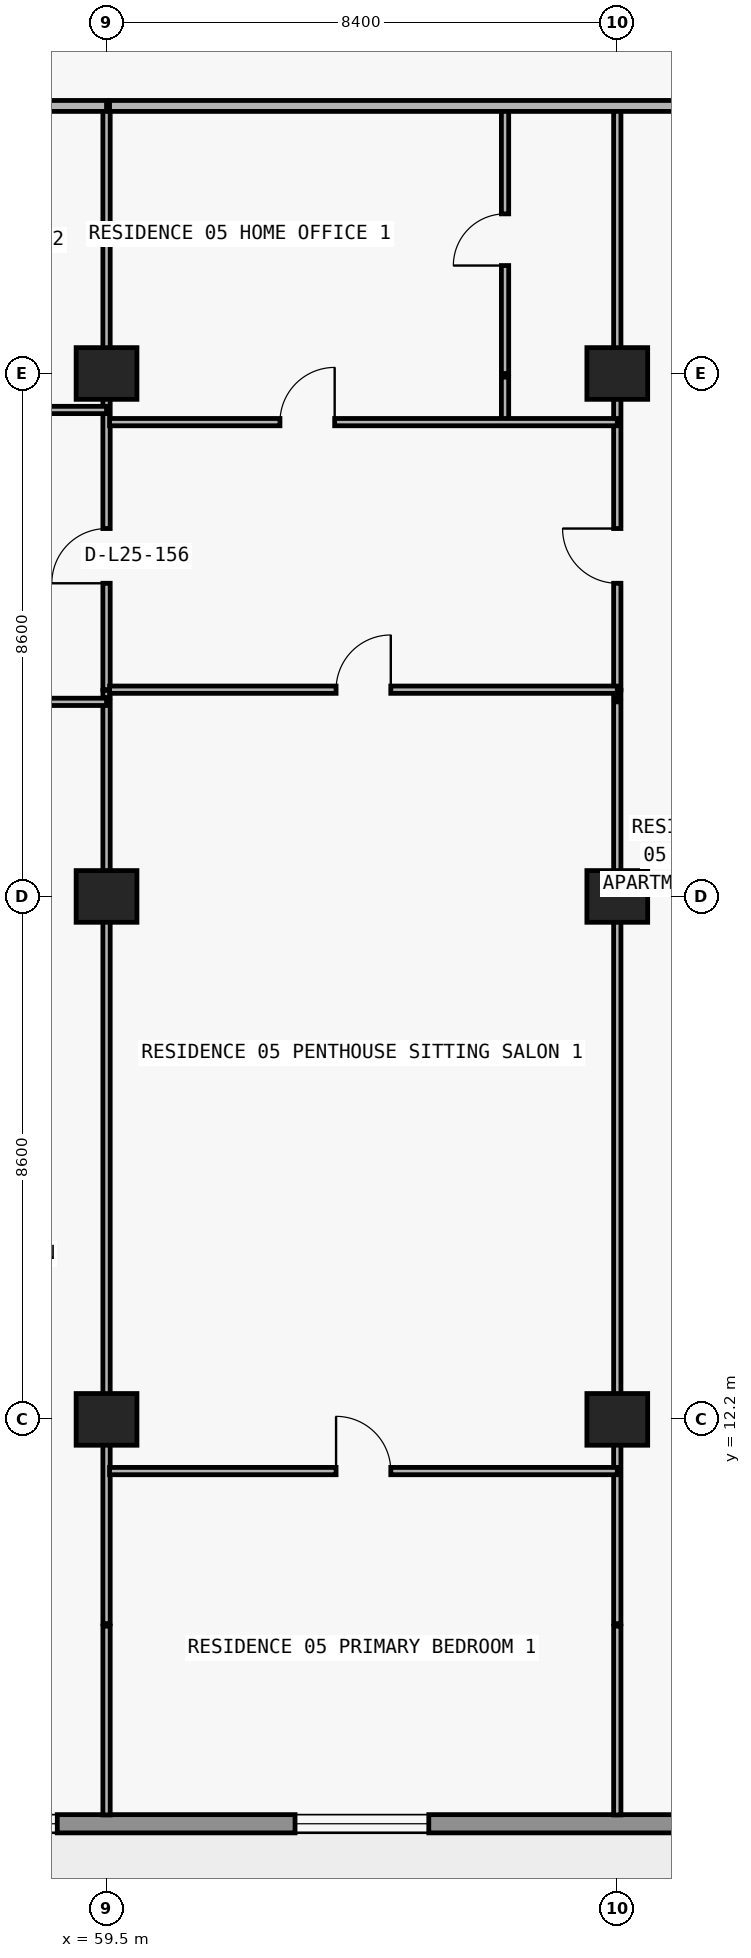
"""IFC4 building model, lengths in metres.
Left out: names, types, materials, properties, quantities, classifications, styles, units other than length and angle.
Written with IfcOpenShell. Run it as: python <this file> out.ifc"""

import sys

from ifc_helpers import new_model, si_unit, direction, frame, frame_2d, origin, origin_2d, place, context, subcontext, project, spatial, rectangle, extrude, element, fill, save


model = new_model("IFC4")
c1 = context("Model", 3, precision=1e-05, world=origin(), true_north=direction((0.0, 1.0)))
c2 = subcontext(c1, "Body", "Model", "MODEL_VIEW")
j1 = project(units=[si_unit("LENGTHUNIT", "METRE"), si_unit("PLANEANGLEUNIT", "RADIAN")], contexts=[c1])
p1 = place(None, origin())
s1 = spatial("IfcSite", under=j1, at=p1, CompositionType="ELEMENT")
p2 = place(p1, origin())
s2 = spatial("IfcBuilding", under=s1, at=p2, CompositionType="ELEMENT")
p3 = place(p2, frame((0.0, 0.0, 94.5)))
s3 = spatial("IfcBuildingStorey", under=s2, at=p3, CompositionType="ELEMENT", Elevation=94.5)
for number, where, z_axis, x_axis in (
    (1, (59.5, 12.2, 0.0), (0.0, 0.0, 1.0), (1.0, 0.0, 0.0)),
    (2, (67.9, 12.2, 0.0), (0.0, 0.0, 1.0), (1.0, 0.0, 0.0)),
    (3, (59.5, 20.8, 0.0), (0.0, 0.0, 1.0), (1.0, 0.0, 0.0)),
    (4, (67.9, 20.8, 0.0), (0.0, 0.0, 1.0), (1.0, 0.0, 0.0)),
    (5, (59.5, 29.4, 0.0), (0.0, 0.0, 1.0), (1.0, 0.0, 0.0)),
    (6, (67.9, 29.4, 0.0), (0.0, 0.0, 1.0), (1.0, 0.0, 0.0)),
):
    element("IfcColumn", number, at=place(p3, frame(where, z_axis=z_axis, x_axis=x_axis)), inside=s3, PredefinedType="COLUMN", context=c2, shape_type="SweptSolid", body=[
        extrude(rectangle(XDim=1.0, YDim=0.85, at=origin_2d()), origin(), (0.0, 0.0, 1.0), 3.0),
    ])
p4 = place(p3, frame((70.1, 5.55, 0.0), z_axis=(0.0, 0.0, 1.0), x_axis=(-1.0, 0.0, 0.0)))
e7 = element("IfcWall", 7, at=p4, inside=s3, PredefinedType="STANDARD", context=c2, shape_type="SweptSolid", body=[
    extrude(rectangle(XDim=62.4, YDim=0.3, at=frame_2d((31.2, 0.0))), origin(), (0.0, 0.0, 1.0), 3.0),
])
p5 = place(p4, frame((57.29, 0.0, 0.0)))
e8 = element("IfcOpeningElement", 8, at=p5, cuts=e7, PredefinedType="OPENING", context=c2, shape_type="SweptSolid", body=[
    extrude(rectangle(XDim=2.0, YDim=2.3, at=frame_2d((1.0, 1.15))), frame((0.0, 0.16, 0.0), z_axis=(0.0, -1.0, 0.0), x_axis=(1.0, 0.0, 0.0)), (0.0, 0.0, 1.0), 0.32),
])
p6 = place(p4, frame((52.61, 0.0, 0.65)))
e9 = element("IfcOpeningElement", 9, at=p6, cuts=e7, PredefinedType="OPENING", context=c2, shape_type="SweptSolid", body=[
    extrude(rectangle(XDim=2.6, YDim=1.85, at=frame_2d((1.3, 0.925))), frame((0.0, 0.16, 0.0), z_axis=(0.0, -1.0, 0.0), x_axis=(1.0, 0.0, 0.0)), (0.0, 0.0, 1.0), 0.32),
])
p7 = place(p4, frame((46.5, 0.0, 0.85)))
e10 = element("IfcOpeningElement", 10, at=p7, cuts=e7, PredefinedType="OPENING", context=c2, shape_type="SweptSolid", body=[
    extrude(rectangle(XDim=2.2, YDim=1.55, at=frame_2d((1.1, 0.775))), frame((0.0, 0.16, 0.0), z_axis=(0.0, -1.0, 0.0), x_axis=(1.0, 0.0, 0.0)), (0.0, 0.0, 1.0), 0.32),
])
p8 = place(p4, frame((40.09, 0.0, 0.0)))
e11 = element("IfcOpeningElement", 11, at=p8, cuts=e7, PredefinedType="OPENING", context=c2, shape_type="SweptSolid", body=[
    extrude(rectangle(XDim=2.0, YDim=2.3, at=frame_2d((1.0, 1.15))), frame((0.0, 0.16, 0.0), z_axis=(0.0, -1.0, 0.0), x_axis=(1.0, 0.0, 0.0)), (0.0, 0.0, 1.0), 0.32),
])
p9 = place(p4, frame((35.99, 0.0, 0.85)))
e12 = element("IfcOpeningElement", 12, at=p9, cuts=e7, PredefinedType="OPENING", context=c2, shape_type="SweptSolid", body=[
    extrude(rectangle(XDim=1.8, YDim=1.55, at=frame_2d((0.9, 0.775))), frame((0.0, 0.16, 0.0), z_axis=(0.0, -1.0, 0.0), x_axis=(1.0, 0.0, 0.0)), (0.0, 0.0, 1.0), 0.32),
])
p10 = place(p4, frame((28.314, 0.0, 0.85)))
e13 = element("IfcOpeningElement", 13, at=p10, cuts=e7, PredefinedType="OPENING", context=c2, shape_type="SweptSolid", body=[
    extrude(rectangle(XDim=2.2, YDim=1.55, at=frame_2d((1.1, 0.775))), frame((0.0, 0.16, 0.0), z_axis=(0.0, -1.0, 0.0), x_axis=(1.0, 0.0, 0.0)), (0.0, 0.0, 1.0), 0.32),
])
p11 = place(p4, frame((24.09, 0.0, 0.0)))
e14 = element("IfcOpeningElement", 14, at=p11, cuts=e7, PredefinedType="OPENING", context=c2, shape_type="SweptSolid", body=[
    extrude(rectangle(XDim=2.0, YDim=2.3, at=frame_2d((1.0, 1.15))), frame((0.0, 0.16, 0.0), z_axis=(0.0, -1.0, 0.0), x_axis=(1.0, 0.0, 0.0)), (0.0, 0.0, 1.0), 0.32),
])
p12 = place(p4, frame((19.99, 0.0, 0.85)))
e15 = element("IfcOpeningElement", 15, at=p12, cuts=e7, PredefinedType="OPENING", context=c2, shape_type="SweptSolid", body=[
    extrude(rectangle(XDim=1.8, YDim=1.55, at=frame_2d((0.9, 0.775))), frame((0.0, 0.16, 0.0), z_axis=(0.0, -1.0, 0.0), x_axis=(1.0, 0.0, 0.0)), (0.0, 0.0, 1.0), 0.32),
])
p13 = place(p4, frame((16.09, 0.0, 0.0)))
e16 = element("IfcOpeningElement", 16, at=p13, cuts=e7, PredefinedType="OPENING", context=c2, shape_type="SweptSolid", body=[
    extrude(rectangle(XDim=2.0, YDim=2.3, at=frame_2d((1.0, 1.15))), frame((0.0, 0.16, 0.0), z_axis=(0.0, -1.0, 0.0), x_axis=(1.0, 0.0, 0.0)), (0.0, 0.0, 1.0), 0.32),
])
p14 = place(p4, frame((11.41, 0.0, 0.65)))
e17 = element("IfcOpeningElement", 17, at=p14, cuts=e7, PredefinedType="OPENING", context=c2, shape_type="SweptSolid", body=[
    extrude(rectangle(XDim=2.6, YDim=1.85, at=frame_2d((1.3, 0.925))), frame((0.0, 0.16, 0.0), z_axis=(0.0, -1.0, 0.0), x_axis=(1.0, 0.0, 0.0)), (0.0, 0.0, 1.0), 0.32),
])
p15 = place(p4, frame((5.3, 0.0, 0.85)))
e18 = element("IfcOpeningElement", 18, at=p15, cuts=e7, PredefinedType="OPENING", context=c2, shape_type="SweptSolid", body=[
    extrude(rectangle(XDim=2.2, YDim=1.55, at=frame_2d((1.1, 0.775))), frame((0.0, 0.16, 0.0), z_axis=(0.0, -1.0, 0.0), x_axis=(1.0, 0.0, 0.0)), (0.0, 0.0, 1.0), 0.32),
])
p16 = place(p3, frame((59.5, 5.695, 0.0), z_axis=(0.0, 0.0, 1.0), x_axis=(0.0, 1.0, 0.0)))
e19 = element("IfcWall", 19, at=p16, inside=s3, PredefinedType="PARTITIONING", context=c2, shape_type="SweptSolid", body=[
    extrude(rectangle(XDim=3.105, YDim=0.12, at=frame_2d((1.552, 0.0))), origin(), (0.0, 0.0, 1.0), 3.0),
])
p17 = place(p3, frame((59.5, 8.84, 0.0), z_axis=(0.0, 0.0, 1.0), x_axis=(0.0, 1.0, 0.0)))
e20 = element("IfcWall", 20, at=p17, inside=s3, PredefinedType="PARTITIONING", context=c2, shape_type="SweptSolid", body=[
    extrude(rectangle(XDim=15.16, YDim=0.12, at=frame_2d((7.58, 0.0))), origin(), (0.0, 0.0, 1.0), 2.124),
])
p18 = place(p3, frame((59.5, 24.07, 0.0), z_axis=(0.0, 0.0, 1.0), x_axis=(0.0, 1.0, 0.0)))
e21 = element("IfcWall", 21, at=p18, inside=s3, PredefinedType="PARTITIONING", context=c2, shape_type="SweptSolid", body=[
    extrude(rectangle(XDim=0.12, YDim=0.12, at=frame_2d((0.06, 0.0))), origin(), (0.0, 0.0, 1.0), 2.124),
])
p19 = place(p3, frame((59.5, 24.2, 0.0), z_axis=(0.0, 0.0, 1.0), x_axis=(0.0, 1.0, 0.0)))
e22 = element("IfcWall", 22, at=p19, inside=s3, PredefinedType="PARTITIONING", context=c2, shape_type="SweptSolid", body=[
    extrude(rectangle(XDim=5.14, YDim=0.12, at=frame_2d((2.57, 0.0))), origin(), (0.0, 0.0, 1.0), 2.124),
])
p20 = place(p19, frame((1.75, 0.0, 0.0)))
e23 = element("IfcOpeningElement", 23, at=p20, cuts=e22, PredefinedType="OPENING", context=c2, shape_type="SweptSolid", body=[
    extrude(rectangle(XDim=0.9, YDim=2.074, at=frame_2d((0.45, 1.037))), frame((0.0, 0.07, 0.0), z_axis=(0.0, -1.0, 0.0), x_axis=(1.0, 0.0, 0.0)), (0.0, 0.0, 1.0), 0.14),
])
p21 = place(p3, frame((59.5, 29.4, 0.0), z_axis=(0.0, 0.0, 1.0), x_axis=(0.0, 1.0, 0.0)))
e24 = element("IfcWall", 24, at=p21, inside=s3, PredefinedType="PARTITIONING", context=c2, shape_type="SweptSolid", body=[
    extrude(rectangle(XDim=4.4, YDim=0.12, at=frame_2d((2.2, 0.0))), origin(), (0.0, 0.0, 1.0), 2.124),
])
p22 = place(p3, frame((66.054, 28.6, 0.0), z_axis=(0.0, 0.0, 1.0), x_axis=(0.0, 1.0, 0.0)))
e25 = element("IfcWall", 25, at=p22, inside=s3, PredefinedType="PARTITIONING", context=c2, shape_type="SweptSolid", body=[
    extrude(rectangle(XDim=0.74, YDim=0.12, at=frame_2d((0.37, 0.0))), origin(), (0.0, 0.0, 1.0), 2.629),
])
p23 = place(p3, frame((66.054, 29.4, 0.0), z_axis=(0.0, 0.0, 1.0), x_axis=(0.0, 1.0, 0.0)))
e26 = element("IfcWall", 26, at=p23, inside=s3, PredefinedType="PARTITIONING", context=c2, shape_type="SweptSolid", body=[
    extrude(rectangle(XDim=4.4, YDim=0.12, at=frame_2d((2.2, 0.0))), origin(), (0.0, 0.0, 1.0), 2.629),
])
p24 = place(p23, frame((1.775, 0.0, 0.0)))
e27 = element("IfcOpeningElement", 27, at=p24, cuts=e26, PredefinedType="OPENING", context=c2, shape_type="SweptSolid", body=[
    extrude(rectangle(XDim=0.85, YDim=2.1, at=frame_2d((0.425, 1.05))), frame((0.0, 0.07, 0.0), z_axis=(0.0, -1.0, 0.0), x_axis=(1.0, 0.0, 0.0)), (0.0, 0.0, 1.0), 0.14),
])
p25 = place(p3, frame((67.9, 5.695, 0.0), z_axis=(0.0, 0.0, 1.0), x_axis=(0.0, 1.0, 0.0)))
e28 = element("IfcWall", 28, at=p25, inside=s3, PredefinedType="PARTITIONING", context=c2, shape_type="SweptSolid", body=[
    extrude(rectangle(XDim=3.105, YDim=0.12, at=frame_2d((1.552, 0.0))), origin(), (0.0, 0.0, 1.0), 3.0),
])
p26 = place(p3, frame((67.9, 8.84, 0.0), z_axis=(0.0, 0.0, 1.0), x_axis=(0.0, 1.0, 0.0)))
e29 = element("IfcWall", 29, at=p26, inside=s3, PredefinedType="PARTITIONING", context=c2, shape_type="SweptSolid", body=[
    extrude(rectangle(XDim=15.16, YDim=0.12, at=frame_2d((7.58, 0.0))), origin(), (0.0, 0.0, 1.0), 2.124),
])
p27 = place(p3, frame((67.9, 24.07, 0.0), z_axis=(0.0, 0.0, 1.0), x_axis=(0.0, 1.0, 0.0)))
e30 = element("IfcWall", 30, at=p27, inside=s3, PredefinedType="PARTITIONING", context=c2, shape_type="SweptSolid", body=[
    extrude(rectangle(XDim=0.12, YDim=0.12, at=frame_2d((0.06, 0.0))), origin(), (0.0, 0.0, 1.0), 2.124),
])
p28 = place(p3, frame((67.9, 24.2, 0.0), z_axis=(0.0, 0.0, 1.0), x_axis=(0.0, 1.0, 0.0)))
e31 = element("IfcWall", 31, at=p28, inside=s3, PredefinedType="PARTITIONING", context=c2, shape_type="SweptSolid", body=[
    extrude(rectangle(XDim=5.14, YDim=0.12, at=frame_2d((2.57, 0.0))), origin(), (0.0, 0.0, 1.0), 2.124),
])
p29 = place(p28, frame((1.75, 0.0, 0.0)))
e32 = element("IfcOpeningElement", 32, at=p29, cuts=e31, PredefinedType="OPENING", context=c2, shape_type="SweptSolid", body=[
    extrude(rectangle(XDim=0.9, YDim=2.074, at=frame_2d((0.45, 1.037))), frame((0.0, 0.07, 0.0), z_axis=(0.0, -1.0, 0.0), x_axis=(1.0, 0.0, 0.0)), (0.0, 0.0, 1.0), 0.14),
])
p30 = place(p3, frame((67.9, 29.4, 0.0), z_axis=(0.0, 0.0, 1.0), x_axis=(0.0, 1.0, 0.0)))
e33 = element("IfcWall", 33, at=p30, inside=s3, PredefinedType="PARTITIONING", context=c2, shape_type="SweptSolid", body=[
    extrude(rectangle(XDim=4.4, YDim=0.12, at=frame_2d((2.2, 0.0))), origin(), (0.0, 0.0, 1.0), 2.124),
])
p31 = place(p3, frame((59.55, 11.35, 0.0), z_axis=(0.0, 0.0, 1.0), x_axis=(1.0, 0.0, 0.0)))
e34 = element("IfcWall", 34, at=p31, inside=s3, PredefinedType="PARTITIONING", context=c2, shape_type="SweptSolid", body=[
    extrude(rectangle(XDim=8.35, YDim=0.12, at=frame_2d((4.175, 0.0))), origin(), (0.0, 0.0, 1.0), 3.0),
])
p32 = place(p31, frame((3.725, 0.0, 0.0)))
e35 = element("IfcOpeningElement", 35, at=p32, cuts=e34, PredefinedType="OPENING", context=c2, shape_type="SweptSolid", body=[
    extrude(rectangle(XDim=0.9, YDim=2.15, at=frame_2d((0.45, 1.075))), frame((0.0, 0.07, 0.0), z_axis=(0.0, -1.0, 0.0), x_axis=(1.0, 0.0, 0.0)), (0.0, 0.0, 1.0), 0.14),
])
p33 = place(p3, frame((51.37, 24.0, 0.0), z_axis=(0.0, 0.0, 1.0), x_axis=(1.0, 0.0, 0.0)))
e36 = element("IfcWall", 36, at=p33, inside=s3, PredefinedType="PARTITIONING", context=c2, shape_type="SweptSolid", body=[
    extrude(rectangle(XDim=8.13, YDim=0.12, at=frame_2d((4.065, 0.0))), origin(), (0.0, 0.0, 1.0), 3.0),
])
p34 = place(p33, frame((1.305, 0.0, 0.0)))
e37 = element("IfcOpeningElement", 37, at=p34, cuts=e36, PredefinedType="OPENING", context=c2, shape_type="SweptSolid", body=[
    extrude(rectangle(XDim=0.9, YDim=2.15, at=frame_2d((0.45, 1.075))), frame((0.0, 0.07, 0.0), z_axis=(0.0, -1.0, 0.0), x_axis=(1.0, 0.0, 0.0)), (0.0, 0.0, 1.0), 0.14),
])
p35 = place(p3, frame((59.55, 24.2, 0.0), z_axis=(0.0, 0.0, 1.0), x_axis=(1.0, 0.0, 0.0)))
e38 = element("IfcWall", 38, at=p35, inside=s3, PredefinedType="PARTITIONING", context=c2, shape_type="SweptSolid", body=[
    extrude(rectangle(XDim=8.35, YDim=0.12, at=frame_2d((4.175, 0.0))), origin(), (0.0, 0.0, 1.0), 3.0),
])
p36 = place(p35, frame((3.725, 0.0, 0.0)))
e39 = element("IfcOpeningElement", 39, at=p36, cuts=e38, PredefinedType="OPENING", context=c2, shape_type="SweptSolid", body=[
    extrude(rectangle(XDim=0.9, YDim=2.15, at=frame_2d((0.45, 1.075))), frame((0.0, 0.07, 0.0), z_axis=(0.0, -1.0, 0.0), x_axis=(1.0, 0.0, 0.0)), (0.0, 0.0, 1.0), 0.14),
])
p37 = place(p3, frame((59.55, 28.6, 0.0), z_axis=(0.0, 0.0, 1.0), x_axis=(1.0, 0.0, 0.0)))
e40 = element("IfcWall", 40, at=p37, inside=s3, PredefinedType="PARTITIONING", context=c2, shape_type="SweptSolid", body=[
    extrude(rectangle(XDim=8.35, YDim=0.12, at=frame_2d((4.175, 0.0))), origin(), (0.0, 0.0, 1.0), 3.0),
])
p38 = place(p37, frame((2.802, 0.0, 0.0)))
e41 = element("IfcOpeningElement", 41, at=p38, cuts=e40, PredefinedType="OPENING", context=c2, shape_type="SweptSolid", body=[
    extrude(rectangle(XDim=0.9, YDim=2.15, at=frame_2d((0.45, 1.075))), frame((0.0, 0.07, 0.0), z_axis=(0.0, -1.0, 0.0), x_axis=(1.0, 0.0, 0.0)), (0.0, 0.0, 1.0), 0.14),
])
p39 = place(p3, frame((51.37, 28.8, 0.0), z_axis=(0.0, 0.0, 1.0), x_axis=(1.0, 0.0, 0.0)))
e42 = element("IfcWall", 42, at=p39, inside=s3, PredefinedType="PARTITIONING", context=c2, shape_type="SweptSolid", body=[
    extrude(rectangle(XDim=8.13, YDim=0.12, at=frame_2d((4.065, 0.0))), origin(), (0.0, 0.0, 1.0), 3.0),
])
p40 = place(p39, frame((1.305, 0.0, 0.0)))
e43 = element("IfcOpeningElement", 43, at=p40, cuts=e42, PredefinedType="OPENING", context=c2, shape_type="SweptSolid", body=[
    extrude(rectangle(XDim=0.9, YDim=2.15, at=frame_2d((0.45, 1.075))), frame((0.0, 0.07, 0.0), z_axis=(0.0, -1.0, 0.0), x_axis=(1.0, 0.0, 0.0)), (0.0, 0.0, 1.0), 0.14),
])
p41 = place(p3, frame((18.3, 33.8, 0.0), z_axis=(0.0, 0.0, 1.0), x_axis=(1.0, 0.0, 0.0)))
e44 = element("IfcWall", 44, at=p41, inside=s3, PredefinedType="PARTITIONING", context=c2, shape_type="SweptSolid", body=[
    extrude(rectangle(XDim=41.2, YDim=0.18, at=frame_2d((20.6, 0.0))), origin(), (0.0, 0.0, 1.0), 3.0),
])
p42 = place(p41, frame((10.946, 0.0, 0.0)))
e45 = element("IfcOpeningElement", 45, at=p42, cuts=e44, PredefinedType="OPENING", context=c2, shape_type="SweptSolid", body=[
    extrude(rectangle(XDim=1.0, YDim=2.2, at=frame_2d((0.5, 1.1))), frame((0.0, 0.1, 0.0), z_axis=(0.0, -1.0, 0.0), x_axis=(1.0, 0.0, 0.0)), (0.0, 0.0, 1.0), 0.2),
])
p43 = place(p41, frame((19.113, 0.0, 0.0)))
e46 = element("IfcOpeningElement", 46, at=p43, cuts=e44, PredefinedType="OPENING", context=c2, shape_type="SweptSolid", body=[
    extrude(rectangle(XDim=1.0, YDim=2.2, at=frame_2d((0.5, 1.1))), frame((0.0, 0.1, 0.0), z_axis=(0.0, -1.0, 0.0), x_axis=(1.0, 0.0, 0.0)), (0.0, 0.0, 1.0), 0.2),
])
p44 = place(p41, frame((26.976, 0.0, 0.0)))
e47 = element("IfcOpeningElement", 47, at=p44, cuts=e44, PredefinedType="OPENING", context=c2, shape_type="SweptSolid", body=[
    extrude(rectangle(XDim=1.0, YDim=2.2, at=frame_2d((0.5, 1.1))), frame((0.0, 0.1, 0.0), z_axis=(0.0, -1.0, 0.0), x_axis=(1.0, 0.0, 0.0)), (0.0, 0.0, 1.0), 0.2),
])
p45 = place(p41, frame((35.47, 0.0, 0.0)))
e48 = element("IfcOpeningElement", 48, at=p45, cuts=e44, PredefinedType="OPENING", context=c2, shape_type="SweptSolid", body=[
    extrude(rectangle(XDim=1.0, YDim=2.2, at=frame_2d((0.5, 1.1))), frame((0.0, 0.1, 0.0), z_axis=(0.0, -1.0, 0.0), x_axis=(1.0, 0.0, 0.0)), (0.0, 0.0, 1.0), 0.2),
])
p46 = place(p3, frame((59.55, 33.8, 0.0), z_axis=(0.0, 0.0, 1.0), x_axis=(1.0, 0.0, 0.0)))
e49 = element("IfcWall", 49, at=p46, inside=s3, PredefinedType="PARTITIONING", context=c2, shape_type="SweptSolid", body=[
    extrude(rectangle(XDim=10.55, YDim=0.18, at=frame_2d((5.275, 0.0))), origin(), (0.0, 0.0, 1.0), 3.0),
])
p47 = place(p14, origin())
e50 = element("IfcWindow", 50, at=p47, inside=s3, PartitioningType="SINGLE_PANEL", PredefinedType="WINDOW", context=c2, shape_type="SweptSolid", body=[
    extrude(rectangle(XDim=2.6, YDim=1.85, at=frame_2d((1.3, 0.925))), frame((0.0, 0.03, 0.0), z_axis=(0.0, -1.0, 0.0), x_axis=(1.0, 0.0, 0.0)), (0.0, 0.0, 1.0), 0.06),
])
fill(e17, e50)
p48 = place(p15, origin())
e51 = element("IfcWindow", 51, at=p48, inside=s3, PartitioningType="SINGLE_PANEL", PredefinedType="WINDOW", context=c2, shape_type="SweptSolid", body=[
    extrude(rectangle(XDim=2.2, YDim=1.55, at=frame_2d((1.1, 0.775))), frame((0.0, 0.03, 0.0), z_axis=(0.0, -1.0, 0.0), x_axis=(1.0, 0.0, 0.0)), (0.0, 0.0, 1.0), 0.06),
])
fill(e18, e51)
p49 = place(p20, origin())
e52 = element("IfcDoor", 52, at=p49, inside=s3, OperationType="SINGLE_SWING_LEFT", PredefinedType="DOOR", context=c2, shape_type="SweptSolid", body=[
    extrude(rectangle(XDim=0.9, YDim=2.074, at=frame_2d((0.45, 1.037))), frame((0.0, 0.025, 0.0), z_axis=(0.0, -1.0, 0.0), x_axis=(1.0, 0.0, 0.0)), (0.0, 0.0, 1.0), 0.05),
])
fill(e23, e52)
p50 = place(p38, origin())
e53 = element("IfcDoor", 53, at=p50, inside=s3, OperationType="SINGLE_SWING_RIGHT", PredefinedType="DOOR", context=c2, shape_type="SweptSolid", body=[
    extrude(rectangle(XDim=0.9, YDim=2.15, at=frame_2d((0.45, 1.075))), frame((0.0, 0.025, 0.0), z_axis=(0.0, -1.0, 0.0), x_axis=(1.0, 0.0, 0.0)), (0.0, 0.0, 1.0), 0.05),
])
fill(e41, e53)
p51 = place(p24, origin())
e54 = element("IfcDoor", 54, at=p51, inside=s3, OperationType="SINGLE_SWING_LEFT", PredefinedType="DOOR", context=c2, shape_type="SweptSolid", body=[
    extrude(rectangle(XDim=0.85, YDim=2.1, at=frame_2d((0.425, 1.05))), frame((0.0, 0.025, 0.0), z_axis=(0.0, -1.0, 0.0), x_axis=(1.0, 0.0, 0.0)), (0.0, 0.0, 1.0), 0.05),
])
fill(e27, e54)
p52 = place(p36, origin())
e55 = element("IfcDoor", 55, at=p52, inside=s3, OperationType="SINGLE_SWING_RIGHT", PredefinedType="DOOR", context=c2, shape_type="SweptSolid", body=[
    extrude(rectangle(XDim=0.9, YDim=2.15, at=frame_2d((0.45, 1.075))), frame((0.0, 0.025, 0.0), z_axis=(0.0, -1.0, 0.0), x_axis=(1.0, 0.0, 0.0)), (0.0, 0.0, 1.0), 0.05),
])
fill(e39, e55)
p53 = place(p32, origin())
e56 = element("IfcDoor", 56, at=p53, inside=s3, OperationType="SINGLE_SWING_LEFT", PredefinedType="DOOR", context=c2, shape_type="SweptSolid", body=[
    extrude(rectangle(XDim=0.9, YDim=2.15, at=frame_2d((0.45, 1.075))), frame((0.0, 0.025, 0.0), z_axis=(0.0, -1.0, 0.0), x_axis=(1.0, 0.0, 0.0)), (0.0, 0.0, 1.0), 0.05),
])
fill(e35, e56)
p54 = place(p29, origin())
e57 = element("IfcDoor", 57, at=p54, inside=s3, OperationType="SINGLE_SWING_RIGHT", PredefinedType="DOOR", context=c2, shape_type="SweptSolid", body=[
    extrude(rectangle(XDim=0.9, YDim=2.074, at=frame_2d((0.45, 1.037))), frame((0.0, 0.025, 0.0), z_axis=(0.0, -1.0, 0.0), x_axis=(1.0, 0.0, 0.0)), (0.0, 0.0, 1.0), 0.05),
])
fill(e32, e57)
save(model, sys.argv[1])
